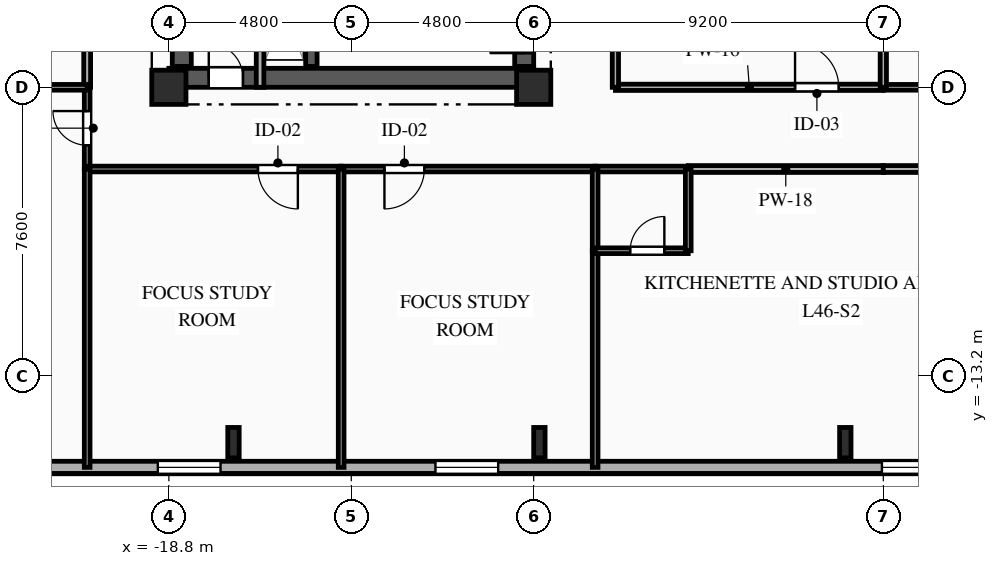
"""IFC4 building model, lengths in metres.
Left out: names, types, materials, properties, quantities, classifications, styles, units other than length and angle.
Written with IfcOpenShell. Run it as: python <this file> out.ifc"""

import sys

from ifc_helpers import new_model, si_unit, direction, frame, frame_2d, origin, origin_2d, place, context, subcontext, project, spatial, rectangle, i_section, extrude, element, fill, save


model = new_model("IFC4")
c1 = context("Model", 3, precision=1e-05, world=origin(), true_north=direction((0.0, 1.0)))
c2 = subcontext(c1, "Body", "Model", "MODEL_VIEW")
j1 = project(units=[si_unit("LENGTHUNIT", "METRE"), si_unit("PLANEANGLEUNIT", "RADIAN")], contexts=[c1])
p1 = place(None, origin())
s1 = spatial("IfcSite", under=j1, at=p1, CompositionType="ELEMENT")
p2 = place(p1, origin())
s2 = spatial("IfcBuilding", under=s1, at=p2, CompositionType="ELEMENT")
p3 = place(p2, frame((0.0, 0.0, 164.5)))
s3 = spatial("IfcBuildingStorey", under=s2, at=p3, CompositionType="ELEMENT", Elevation=164.5)
for number, where, z_axis, x_axis in (
    (1, (-18.8, -5.6, 0.0), (0.0, 0.0, 1.0), (1.0, 0.0, 0.0)),
    (2, (-9.2, -5.6, 0.0), (0.0, 0.0, 1.0), (1.0, 0.0, 0.0)),
):
    element("IfcColumn", number, at=place(p3, frame(where, z_axis=z_axis, x_axis=x_axis)), inside=s3, PredefinedType="COLUMN", context=c2, shape_type="SweptSolid", body=[
        extrude(rectangle(XDim=0.9, YDim=0.9, at=origin_2d()), origin(), (0.0, 0.0, 1.0), 3.35),
    ])
for number, where, z_axis, x_axis in (
    (3, (-17.1, -14.95, 0.0), (0.0, 0.0, 1.0), (1.0, 0.0, 0.0)),
    (4, (-9.05, -14.95, 0.0), (0.0, 0.0, 1.0), (1.0, 0.0, 0.0)),
    (5, (-1.0, -14.95, 0.0), (0.0, 0.0, 1.0), (1.0, 0.0, 0.0)),
):
    element("IfcColumn", number, at=place(p3, frame(where, z_axis=z_axis, x_axis=x_axis)), inside=s3, PredefinedType="COLUMN", context=c2, shape_type="SweptSolid", body=[
        extrude(i_section(OverallWidth=0.3, OverallDepth=0.8, WebThickness=0.018, FlangeThickness=0.033, FilletRadius=0.03, at=origin_2d()), origin(), (0.0, 0.0, 1.0), 3.35),
    ])
p4 = place(p3, frame((23.8, -15.6, 0.0), z_axis=(0.0, 0.0, 1.0), x_axis=(-1.0, 0.0, 0.0)))
e6 = element("IfcWall", 6, at=p4, inside=s3, PredefinedType="SOLIDWALL", context=c2, shape_type="SweptSolid", body=[
    extrude(rectangle(XDim=49.6, YDim=0.32, at=frame_2d((24.8, 0.0))), origin(), (0.0, 0.0, 1.0), 3.04),
])
p5 = place(p4, frame((1.13, 0.0, 0.85)))
e7 = element("IfcOpeningElement", 7, at=p5, cuts=e6, PredefinedType="OPENING", context=c2, shape_type="SweptSolid", body=[
    extrude(rectangle(XDim=1.1, YDim=1.85, at=frame_2d((0.55, 0.925))), frame((0.0, 0.17, 0.0), z_axis=(0.0, -1.0, 0.0), x_axis=(1.0, 0.0, 0.0)), (0.0, 0.0, 1.0), 0.34),
])
p6 = place(p4, frame((5.695, 0.0, 0.85)))
e8 = element("IfcOpeningElement", 8, at=p6, cuts=e6, PredefinedType="OPENING", context=c2, shape_type="SweptSolid", body=[
    extrude(rectangle(XDim=1.65, YDim=1.85, at=frame_2d((0.825, 0.925))), frame((0.0, 0.17, 0.0), z_axis=(0.0, -1.0, 0.0), x_axis=(1.0, 0.0, 0.0)), (0.0, 0.0, 1.0), 0.34),
])
p7 = place(p4, frame((12.975, 0.0, 0.85)))
e9 = element("IfcOpeningElement", 9, at=p7, cuts=e6, PredefinedType="OPENING", context=c2, shape_type="SweptSolid", body=[
    extrude(rectangle(XDim=1.65, YDim=1.85, at=frame_2d((0.825, 0.925))), frame((0.0, 0.17, 0.0), z_axis=(0.0, -1.0, 0.0), x_axis=(1.0, 0.0, 0.0)), (0.0, 0.0, 1.0), 0.34),
])
p8 = place(p4, frame((21.636, 0.0, 0.85)))
e10 = element("IfcOpeningElement", 10, at=p8, cuts=e6, PredefinedType="OPENING", context=c2, shape_type="SweptSolid", body=[
    extrude(rectangle(XDim=2.2, YDim=1.85, at=frame_2d((1.1, 0.925))), frame((0.0, 0.17, 0.0), z_axis=(0.0, -1.0, 0.0), x_axis=(1.0, 0.0, 0.0)), (0.0, 0.0, 1.0), 0.34),
])
p9 = place(p4, frame((33.935, 0.0, 0.85)))
e11 = element("IfcOpeningElement", 11, at=p9, cuts=e6, PredefinedType="OPENING", context=c2, shape_type="SweptSolid", body=[
    extrude(rectangle(XDim=1.65, YDim=1.85, at=frame_2d((0.825, 0.925))), frame((0.0, 0.17, 0.0), z_axis=(0.0, -1.0, 0.0), x_axis=(1.0, 0.0, 0.0)), (0.0, 0.0, 1.0), 0.34),
])
p10 = place(p4, frame((41.24, 0.0, 0.85)))
e12 = element("IfcOpeningElement", 12, at=p10, cuts=e6, PredefinedType="OPENING", context=c2, shape_type="SweptSolid", body=[
    extrude(rectangle(XDim=1.65, YDim=1.85, at=frame_2d((0.825, 0.925))), frame((0.0, 0.17, 0.0), z_axis=(0.0, -1.0, 0.0), x_axis=(1.0, 0.0, 0.0)), (0.0, 0.0, 1.0), 0.34),
])
p11 = place(p4, frame((46.175, 0.0, 0.85)))
e13 = element("IfcOpeningElement", 13, at=p11, cuts=e6, PredefinedType="OPENING", context=c2, shape_type="SweptSolid", body=[
    extrude(rectangle(XDim=1.65, YDim=1.85, at=frame_2d((0.825, 0.925))), frame((0.0, 0.17, 0.0), z_axis=(0.0, -1.0, 0.0), x_axis=(1.0, 0.0, 0.0)), (0.0, 0.0, 1.0), 0.34),
])
p12 = place(p3, frame((-18.8, -5.35, 0.0), z_axis=(0.0, 0.0, 1.0), x_axis=(1.0, 0.0, 0.0)))
e14 = element("IfcWall", 14, at=p12, inside=s3, PredefinedType="SHEAR", context=c2, shape_type="SweptSolid", body=[
    extrude(rectangle(XDim=9.6, YDim=0.5, at=frame_2d((4.8, 0.0))), origin(), (0.0, 0.0, 1.0), 3.04),
])
p13 = place(p12, frame((1.05, 0.0, 0.0)))
e15 = element("IfcOpeningElement", 15, at=p13, cuts=e14, PredefinedType="OPENING", context=c2, shape_type="SweptSolid", body=[
    extrude(rectangle(XDim=0.9, YDim=2.1, at=frame_2d((0.45, 1.05))), frame((0.0, 0.26, 0.0), z_axis=(0.0, -1.0, 0.0), x_axis=(1.0, 0.0, 0.0)), (0.0, 0.0, 1.0), 0.52),
])
p14 = place(p3, frame((-18.46, -5.05, 0.0), z_axis=(0.0, 0.0, 1.0), x_axis=(0.0, 1.0, 0.0)))
e16 = element("IfcWall", 16, at=p14, inside=s3, PredefinedType="SHEAR", context=c2, shape_type="SweptSolid", body=[
    extrude(rectangle(XDim=10.1, YDim=0.5, at=frame_2d((5.05, 0.0))), origin(), (0.0, 0.0, 1.0), 3.04),
])
p15 = place(p3, frame((-9.45, -5.05, 0.0), z_axis=(0.0, 0.0, 1.0), x_axis=(0.0, 1.0, 0.0)))
e17 = element("IfcWall", 17, at=p15, inside=s3, PredefinedType="SHEAR", context=c2, shape_type="SweptSolid", body=[
    extrude(rectangle(XDim=10.1, YDim=0.5, at=frame_2d((5.05, 0.0))), origin(), (0.0, 0.0, 1.0), 3.04),
])
p16 = place(p15, frame((7.175, 0.0, 0.0)))
e18 = element("IfcOpeningElement", 18, at=p16, cuts=e17, PredefinedType="OPENING", context=c2, shape_type="SweptSolid", body=[
    extrude(rectangle(XDim=0.9, YDim=2.1, at=frame_2d((0.45, 1.05))), frame((0.0, 0.26, 0.0), z_axis=(0.0, -1.0, 0.0), x_axis=(1.0, 0.0, 0.0)), (0.0, 0.0, 1.0), 0.52),
])
p17 = place(p15, frame((2.4, 0.0, 0.0)))
e19 = element("IfcOpeningElement", 19, at=p17, cuts=e17, PredefinedType="OPENING", context=c2, shape_type="SweptSolid", body=[
    extrude(rectangle(XDim=1.2, YDim=2.15, at=frame_2d((0.6, 1.075))), frame((0.0, 0.26, 0.0), z_axis=(0.0, -1.0, 0.0), x_axis=(1.0, 0.0, 0.0)), (0.0, 0.0, 1.0), 0.52),
])
p18 = place(p15, frame((0.35, 0.0, 0.0)))
e20 = element("IfcOpeningElement", 20, at=p18, cuts=e17, PredefinedType="OPENING", context=c2, shape_type="SweptSolid", body=[
    extrude(rectangle(XDim=0.9, YDim=2.1, at=frame_2d((0.45, 1.05))), frame((0.0, 0.26, 0.0), z_axis=(0.0, -1.0, 0.0), x_axis=(1.0, 0.0, 0.0)), (0.0, 0.0, 1.0), 0.52),
])
p19 = place(p15, frame((5.0, 0.0, 0.0)))
e21 = element("IfcOpeningElement", 21, at=p19, cuts=e17, PredefinedType="OPENING", context=c2, shape_type="SweptSolid", body=[
    extrude(rectangle(XDim=0.9, YDim=2.1, at=frame_2d((0.45, 1.05))), frame((0.0, 0.26, 0.0), z_axis=(0.0, -1.0, 0.0), x_axis=(1.0, 0.0, 0.0)), (0.0, 0.0, 1.0), 0.52),
])
p20 = place(p3, frame((-15.05, -5.05, 0.0), z_axis=(0.0, 0.0, 1.0), x_axis=(0.0, 1.0, 0.0)))
e22 = element("IfcWall", 22, at=p20, inside=s3, PredefinedType="SHEAR", context=c2, shape_type="SweptSolid", body=[
    extrude(rectangle(XDim=10.1, YDim=0.3, at=frame_2d((5.05, 0.0))), origin(), (0.0, 0.0, 1.0), 3.04),
])
p21 = place(p3, frame((-16.4, -5.6, 0.0), z_axis=(0.0, 0.0, 1.0), x_axis=(0.0, 1.0, 0.0)))
e23 = element("IfcWall", 23, at=p21, inside=s3, PredefinedType="PARTITIONING", context=c2, shape_type="SweptSolid", body=[
    extrude(rectangle(XDim=3.49, YDim=0.2, at=frame_2d((1.745, 0.0))), origin(), (0.0, 0.0, 1.0), 3.04),
])
p22 = place(p3, frame((-20.95, -7.75, 0.0), z_axis=(0.0, 0.0, 1.0), x_axis=(0.0, 1.0, 0.0)))
e24 = element("IfcWall", 24, at=p22, inside=s3, PredefinedType="PARTITIONING", context=c2, shape_type="SweptSolid", body=[
    extrude(rectangle(XDim=2.15, YDim=0.15, at=frame_2d((1.075, 0.0))), origin(), (0.0, 0.0, 1.0), 3.04),
])
p23 = place(p22, frame((0.625, 0.0, 0.0)))
e25 = element("IfcOpeningElement", 25, at=p23, cuts=e24, PredefinedType="OPENING", context=c2, shape_type="SweptSolid", body=[
    extrude(rectangle(XDim=0.9, YDim=2.1, at=frame_2d((0.45, 1.05))), frame((0.0, 0.085, 0.0), z_axis=(0.0, -1.0, 0.0), x_axis=(1.0, 0.0, 0.0)), (0.0, 0.0, 1.0), 0.17),
])
p24 = place(p3, frame((-14.267, -7.75, 0.0), z_axis=(0.0, 0.0, 1.0), x_axis=(-1.0, 0.0, 0.0)))
e26 = element("IfcWall", 26, at=p24, inside=s3, PredefinedType="PARTITIONING", context=c2, shape_type="SweptSolid", body=[
    extrude(rectangle(XDim=6.683, YDim=0.15, at=frame_2d((3.342, 0.0))), origin(), (0.0, 0.0, 1.0), 3.04),
])
p25 = place(p24, frame((1.139, 0.0, 0.0)))
e27 = element("IfcOpeningElement", 27, at=p25, cuts=e26, PredefinedType="OPENING", context=c2, shape_type="SweptSolid", body=[
    extrude(rectangle(XDim=1.05, YDim=2.15, at=frame_2d((0.525, 1.075))), frame((0.0, 0.085, 0.0), z_axis=(0.0, -1.0, 0.0), x_axis=(1.0, 0.0, 0.0)), (0.0, 0.0, 1.0), 0.17),
])
p26 = place(p3, frame((-7.583, -7.75, 0.0), z_axis=(0.0, 0.0, 1.0), x_axis=(-1.0, 0.0, 0.0)))
e28 = element("IfcWall", 28, at=p26, inside=s3, PredefinedType="PARTITIONING", context=c2, shape_type="SweptSolid", body=[
    extrude(rectangle(XDim=6.684, YDim=0.15, at=frame_2d((3.342, 0.0))), origin(), (0.0, 0.0, 1.0), 3.04),
])
p27 = place(p26, frame((4.494, 0.0, 0.0)))
e29 = element("IfcOpeningElement", 29, at=p27, cuts=e28, PredefinedType="OPENING", context=c2, shape_type="SweptSolid", body=[
    extrude(rectangle(XDim=1.05, YDim=2.15, at=frame_2d((0.525, 1.075))), frame((0.0, 0.085, 0.0), z_axis=(0.0, -1.0, 0.0), x_axis=(1.0, 0.0, 0.0)), (0.0, 0.0, 1.0), 0.17),
])
p28 = place(p3, frame((0.0, -7.75, 0.0), z_axis=(0.0, 0.0, 1.0), x_axis=(-1.0, 0.0, 0.0)))
e30 = element("IfcWall", 30, at=p28, inside=s3, PredefinedType="PARTITIONING", context=c2, shape_type="SweptSolid", body=[
    extrude(rectangle(XDim=5.133, YDim=0.18, at=frame_2d((2.566, 0.0))), origin(), (0.0, 0.0, 1.0), 3.04),
])
p29 = place(p3, frame((-5.133, -7.75, 0.0), z_axis=(0.0, 0.0, 1.0), x_axis=(-1.0, 0.0, 0.0)))
e31 = element("IfcWall", 31, at=p29, inside=s3, PredefinedType="PLUMBINGWALL", context=c2, shape_type="SweptSolid", body=[
    extrude(rectangle(XDim=2.45, YDim=0.15, at=frame_2d((1.225, 0.0))), origin(), (0.0, 0.0, 1.0), 3.04),
])
p30 = place(p3, frame((-7.05, -5.6, 0.0), z_axis=(0.0, 0.0, 1.0), x_axis=(1.0, 0.0, 0.0)))
e32 = element("IfcWall", 32, at=p30, inside=s3, PredefinedType="PARTITIONING", context=c2, shape_type="SweptSolid", body=[
    extrude(rectangle(XDim=7.05, YDim=0.165, at=frame_2d((3.525, 0.0))), origin(), (0.0, 0.0, 1.0), 2.525),
])
p31 = place(p30, frame((4.728, 0.0, 0.0)))
e33 = element("IfcOpeningElement", 33, at=p31, cuts=e32, PredefinedType="OPENING", context=c2, shape_type="SweptSolid", body=[
    extrude(rectangle(XDim=1.15, YDim=2.15, at=frame_2d((0.575, 1.075))), frame((0.0, 0.093, 0.0), z_axis=(0.0, -1.0, 0.0), x_axis=(1.0, 0.0, 0.0)), (0.0, 0.0, 1.0), 0.185),
])
p32 = place(p3, frame((6.383, -7.75, 0.0), z_axis=(0.0, 0.0, 1.0), x_axis=(-1.0, 0.0, 0.0)))
e34 = element("IfcWall", 34, at=p32, inside=s3, PredefinedType="PARTITIONING", context=c2, shape_type="SweptSolid", body=[
    extrude(rectangle(XDim=6.383, YDim=0.18, at=frame_2d((3.191, 0.0))), origin(), (0.0, 0.0, 1.0), 3.04),
])
p33 = place(p32, frame((4.275, 0.0, 0.0)))
e35 = element("IfcOpeningElement", 35, at=p33, cuts=e34, PredefinedType="OPENING", context=c2, shape_type="SweptSolid", body=[
    extrude(rectangle(XDim=1.0, YDim=2.15, at=frame_2d((0.5, 1.075))), frame((0.0, 0.1, 0.0), z_axis=(0.0, -1.0, 0.0), x_axis=(1.0, 0.0, 0.0)), (0.0, 0.0, 1.0), 0.2),
])
p34 = place(p3, frame((0.0, -5.6, 0.0), z_axis=(0.0, 0.0, 1.0), x_axis=(1.0, 0.0, 0.0)))
e36 = element("IfcWall", 36, at=p34, inside=s3, PredefinedType="PARTITIONING", context=c2, shape_type="SweptSolid", body=[
    extrude(rectangle(XDim=7.05, YDim=0.15, at=frame_2d((3.525, 0.0))), origin(), (0.0, 0.0, 1.0), 2.525),
])
p35 = place(p34, frame((1.185, 0.0, 0.0)))
e37 = element("IfcOpeningElement", 37, at=p35, cuts=e36, PredefinedType="OPENING", context=c2, shape_type="SweptSolid", body=[
    extrude(rectangle(XDim=1.05, YDim=2.15, at=frame_2d((0.525, 1.075))), frame((0.0, 0.085, 0.0), z_axis=(0.0, -1.0, 0.0), x_axis=(1.0, 0.0, 0.0)), (0.0, 0.0, 1.0), 0.17),
])
p36 = place(p3, frame((-20.95, -5.6, 0.0), z_axis=(0.0, 0.0, 1.0), x_axis=(0.0, 1.0, 0.0)))
e38 = element("IfcWall", 38, at=p36, inside=s3, PredefinedType="PARTITIONING", context=c2, shape_type="SweptSolid", body=[
    extrude(rectangle(XDim=14.1, YDim=0.18, at=frame_2d((7.05, 0.0))), origin(), (0.0, 0.0, 1.0), 3.04),
])
p37 = place(p36, frame((5.058, 0.0, 0.0)))
e39 = element("IfcOpeningElement", 39, at=p37, cuts=e38, PredefinedType="OPENING", context=c2, shape_type="SweptSolid", body=[
    extrude(rectangle(XDim=1.0, YDim=2.15, at=frame_2d((0.5, 1.075))), frame((0.0, 0.1, 0.0), z_axis=(0.0, -1.0, 0.0), x_axis=(1.0, 0.0, 0.0)), (0.0, 0.0, 1.0), 0.2),
])
p38 = place(p3, frame((-7.05, -2.95, 0.0), z_axis=(0.0, 0.0, 1.0), x_axis=(0.0, -1.0, 0.0)))
e40 = element("IfcWall", 40, at=p38, inside=s3, PredefinedType="PARTITIONING", context=c2, shape_type="SweptSolid", body=[
    extrude(rectangle(XDim=2.65, YDim=0.165, at=frame_2d((1.325, 0.0))), origin(), (0.0, 0.0, 1.0), 3.04),
])
p39 = place(p3, frame((-20.95, -5.6, 0.0), z_axis=(0.0, 0.0, 1.0), x_axis=(-1.0, 0.0, 0.0)))
e41 = element("IfcWall", 41, at=p39, inside=s3, PredefinedType="PARTITIONING", context=c2, shape_type="SweptSolid", body=[
    extrude(rectangle(XDim=2.65, YDim=0.15, at=frame_2d((1.325, 0.0))), origin(), (0.0, 0.0, 1.0), 3.04),
])
p40 = place(p39, frame((0.965, 0.0, 0.0)))
e42 = element("IfcOpeningElement", 42, at=p40, cuts=e41, PredefinedType="OPENING", context=c2, shape_type="SweptSolid", body=[
    extrude(rectangle(XDim=1.05, YDim=2.15, at=frame_2d((0.525, 1.075))), frame((0.0, 0.085, 0.0), z_axis=(0.0, -1.0, 0.0), x_axis=(1.0, 0.0, 0.0)), (0.0, 0.0, 1.0), 0.17),
])
for number, where, z_axis, x_axis in (
    (43, (-20.95, -7.75, 0.0), (0.0, 0.0, 1.0), (0.0, -1.0, 0.0)),
    (44, (-14.267, -7.75, 0.0), (0.0, 0.0, 1.0), (0.0, -1.0, 0.0)),
):
    element("IfcWall", number, at=place(p3, frame(where, z_axis=z_axis, x_axis=x_axis)), inside=s3, PredefinedType="PARTITIONING", context=c2, shape_type="SweptSolid", body=[
        extrude(rectangle(XDim=7.85, YDim=0.15, at=frame_2d((3.925, 0.0))), origin(), (0.0, 0.0, 1.0), 3.04),
    ])
p41 = place(p3, frame((-7.583, -9.9, 0.0), z_axis=(0.0, 0.0, 1.0), x_axis=(0.0, -1.0, 0.0)))
e45 = element("IfcWall", 45, at=p41, inside=s3, PredefinedType="PARTITIONING", context=c2, shape_type="SweptSolid", body=[
    extrude(rectangle(XDim=5.7, YDim=0.15, at=frame_2d((2.85, 0.0))), origin(), (0.0, 0.0, 1.0), 3.04),
])
p42 = place(p3, frame((-7.583, -7.75, 0.0), z_axis=(0.0, 0.0, 1.0), x_axis=(0.0, -1.0, 0.0)))
e46 = element("IfcWall", 46, at=p42, inside=s3, PredefinedType="PLUMBINGWALL", context=c2, shape_type="SweptSolid", body=[
    extrude(rectangle(XDim=2.15, YDim=0.15, at=frame_2d((1.075, 0.0))), origin(), (0.0, 0.0, 1.0), 3.04),
])
p43 = place(p3, frame((-7.583, -9.9, 0.0), z_axis=(0.0, 0.0, 1.0), x_axis=(1.0, 0.0, 0.0)))
e47 = element("IfcWall", 47, at=p43, inside=s3, PredefinedType="PLUMBINGWALL", context=c2, shape_type="SweptSolid", body=[
    extrude(rectangle(XDim=2.45, YDim=0.15, at=frame_2d((1.225, 0.0))), origin(), (0.0, 0.0, 1.0), 3.04),
])
p44 = place(p43, frame((0.921, 0.0, 0.0)))
e48 = element("IfcOpeningElement", 48, at=p44, cuts=e47, PredefinedType="OPENING", context=c2, shape_type="SweptSolid", body=[
    extrude(rectangle(XDim=0.9, YDim=2.1, at=frame_2d((0.45, 1.05))), frame((0.0, 0.085, 0.0), z_axis=(0.0, -1.0, 0.0), x_axis=(1.0, 0.0, 0.0)), (0.0, 0.0, 1.0), 0.17),
])
p45 = place(p3, frame((-5.133, -9.9, 0.0), z_axis=(0.0, 0.0, 1.0), x_axis=(0.0, 1.0, 0.0)))
e49 = element("IfcWall", 49, at=p45, inside=s3, PredefinedType="PLUMBINGWALL", context=c2, shape_type="SweptSolid", body=[
    extrude(rectangle(XDim=2.15, YDim=0.15, at=frame_2d((1.075, 0.0))), origin(), (0.0, 0.0, 1.0), 3.04),
])
p46 = place(p3, frame((0.0, -2.95, 0.0), z_axis=(0.0, 0.0, 1.0), x_axis=(0.0, -1.0, 0.0)))
e50 = element("IfcWall", 50, at=p46, inside=s3, PredefinedType="PARTITIONING", context=c2, shape_type="SweptSolid", body=[
    extrude(rectangle(XDim=2.65, YDim=0.165, at=frame_2d((1.325, 0.0))), origin(), (0.0, 0.0, 1.0), 3.04),
])
p47 = place(p8, origin())
e51 = element("IfcWindow", 51, at=p47, inside=s3, PartitioningType="SINGLE_PANEL", PredefinedType="WINDOW", context=c2, shape_type="SweptSolid", body=[
    extrude(rectangle(XDim=2.2, YDim=1.85, at=frame_2d((1.1, 0.925))), frame((0.0, 0.03, 0.0), z_axis=(0.0, -1.0, 0.0), x_axis=(1.0, 0.0, 0.0)), (0.0, 0.0, 1.0), 0.06),
])
fill(e10, e51)
p48 = place(p9, origin())
e52 = element("IfcWindow", 52, at=p48, inside=s3, PartitioningType="SINGLE_PANEL", PredefinedType="WINDOW", context=c2, shape_type="SweptSolid", body=[
    extrude(rectangle(XDim=1.65, YDim=1.85, at=frame_2d((0.825, 0.925))), frame((0.0, 0.03, 0.0), z_axis=(0.0, -1.0, 0.0), x_axis=(1.0, 0.0, 0.0)), (0.0, 0.0, 1.0), 0.06),
])
fill(e11, e52)
p49 = place(p10, origin())
e53 = element("IfcWindow", 53, at=p49, inside=s3, PartitioningType="SINGLE_PANEL", PredefinedType="WINDOW", context=c2, shape_type="SweptSolid", body=[
    extrude(rectangle(XDim=1.65, YDim=1.85, at=frame_2d((0.825, 0.925))), frame((0.0, 0.03, 0.0), z_axis=(0.0, -1.0, 0.0), x_axis=(1.0, 0.0, 0.0)), (0.0, 0.0, 1.0), 0.06),
])
fill(e12, e53)
p50 = place(p13, origin())
e54 = element("IfcDoor", 54, at=p50, inside=s3, OperationType="SINGLE_SWING_LEFT", PredefinedType="DOOR", context=c2, shape_type="SweptSolid", body=[
    extrude(rectangle(XDim=0.9, YDim=2.1, at=frame_2d((0.45, 1.05))), frame((0.0, 0.025, 0.0), z_axis=(0.0, -1.0, 0.0), x_axis=(1.0, 0.0, 0.0)), (0.0, 0.0, 1.0), 0.05),
])
fill(e15, e54)
p51 = place(p18, origin())
e55 = element("IfcDoor", 55, at=p51, inside=s3, OperationType="SINGLE_SWING_LEFT", PredefinedType="DOOR", context=c2, shape_type="SweptSolid", body=[
    extrude(rectangle(XDim=0.9, YDim=2.1, at=frame_2d((0.45, 1.05))), frame((0.0, 0.025, 0.0), z_axis=(0.0, -1.0, 0.0), x_axis=(1.0, 0.0, 0.0)), (0.0, 0.0, 1.0), 0.05),
])
fill(e20, e55)
p52 = place(p23, origin())
e56 = element("IfcDoor", 56, at=p52, inside=s3, OperationType="SINGLE_SWING_RIGHT", PredefinedType="DOOR", context=c2, shape_type="SweptSolid", body=[
    extrude(rectangle(XDim=0.9, YDim=2.1, at=frame_2d((0.45, 1.05))), frame((0.0, 0.025, 0.0), z_axis=(0.0, -1.0, 0.0), x_axis=(1.0, 0.0, 0.0)), (0.0, 0.0, 1.0), 0.05),
])
fill(e25, e56)
p53 = place(p25, origin())
e57 = element("IfcDoor", 57, at=p53, inside=s3, OperationType="SINGLE_SWING_LEFT", PredefinedType="DOOR", context=c2, shape_type="SweptSolid", body=[
    extrude(rectangle(XDim=1.05, YDim=2.15, at=frame_2d((0.525, 1.075))), frame((0.0, 0.025, 0.0), z_axis=(0.0, -1.0, 0.0), x_axis=(1.0, 0.0, 0.0)), (0.0, 0.0, 1.0), 0.05),
])
fill(e27, e57)
p54 = place(p27, origin())
e58 = element("IfcDoor", 58, at=p54, inside=s3, OperationType="SINGLE_SWING_RIGHT", PredefinedType="DOOR", context=c2, shape_type="SweptSolid", body=[
    extrude(rectangle(XDim=1.05, YDim=2.15, at=frame_2d((0.525, 1.075))), frame((0.0, 0.025, 0.0), z_axis=(0.0, -1.0, 0.0), x_axis=(1.0, 0.0, 0.0)), (0.0, 0.0, 1.0), 0.05),
])
fill(e29, e58)
p55 = place(p31, origin())
e59 = element("IfcDoor", 59, at=p55, inside=s3, OperationType="SINGLE_SWING_LEFT", PredefinedType="DOOR", context=c2, shape_type="SweptSolid", body=[
    extrude(rectangle(XDim=1.15, YDim=2.15, at=frame_2d((0.575, 1.075))), frame((0.0, 0.025, 0.0), z_axis=(0.0, -1.0, 0.0), x_axis=(1.0, 0.0, 0.0)), (0.0, 0.0, 1.0), 0.05),
])
fill(e33, e59)
p56 = place(p44, origin())
e60 = element("IfcDoor", 60, at=p56, inside=s3, OperationType="SINGLE_SWING_RIGHT", PredefinedType="DOOR", context=c2, shape_type="SweptSolid", body=[
    extrude(rectangle(XDim=0.9, YDim=2.1, at=frame_2d((0.45, 1.05))), frame((0.0, 0.025, 0.0), z_axis=(0.0, -1.0, 0.0), x_axis=(1.0, 0.0, 0.0)), (0.0, 0.0, 1.0), 0.05),
])
fill(e48, e60)
save(model, sys.argv[1])
